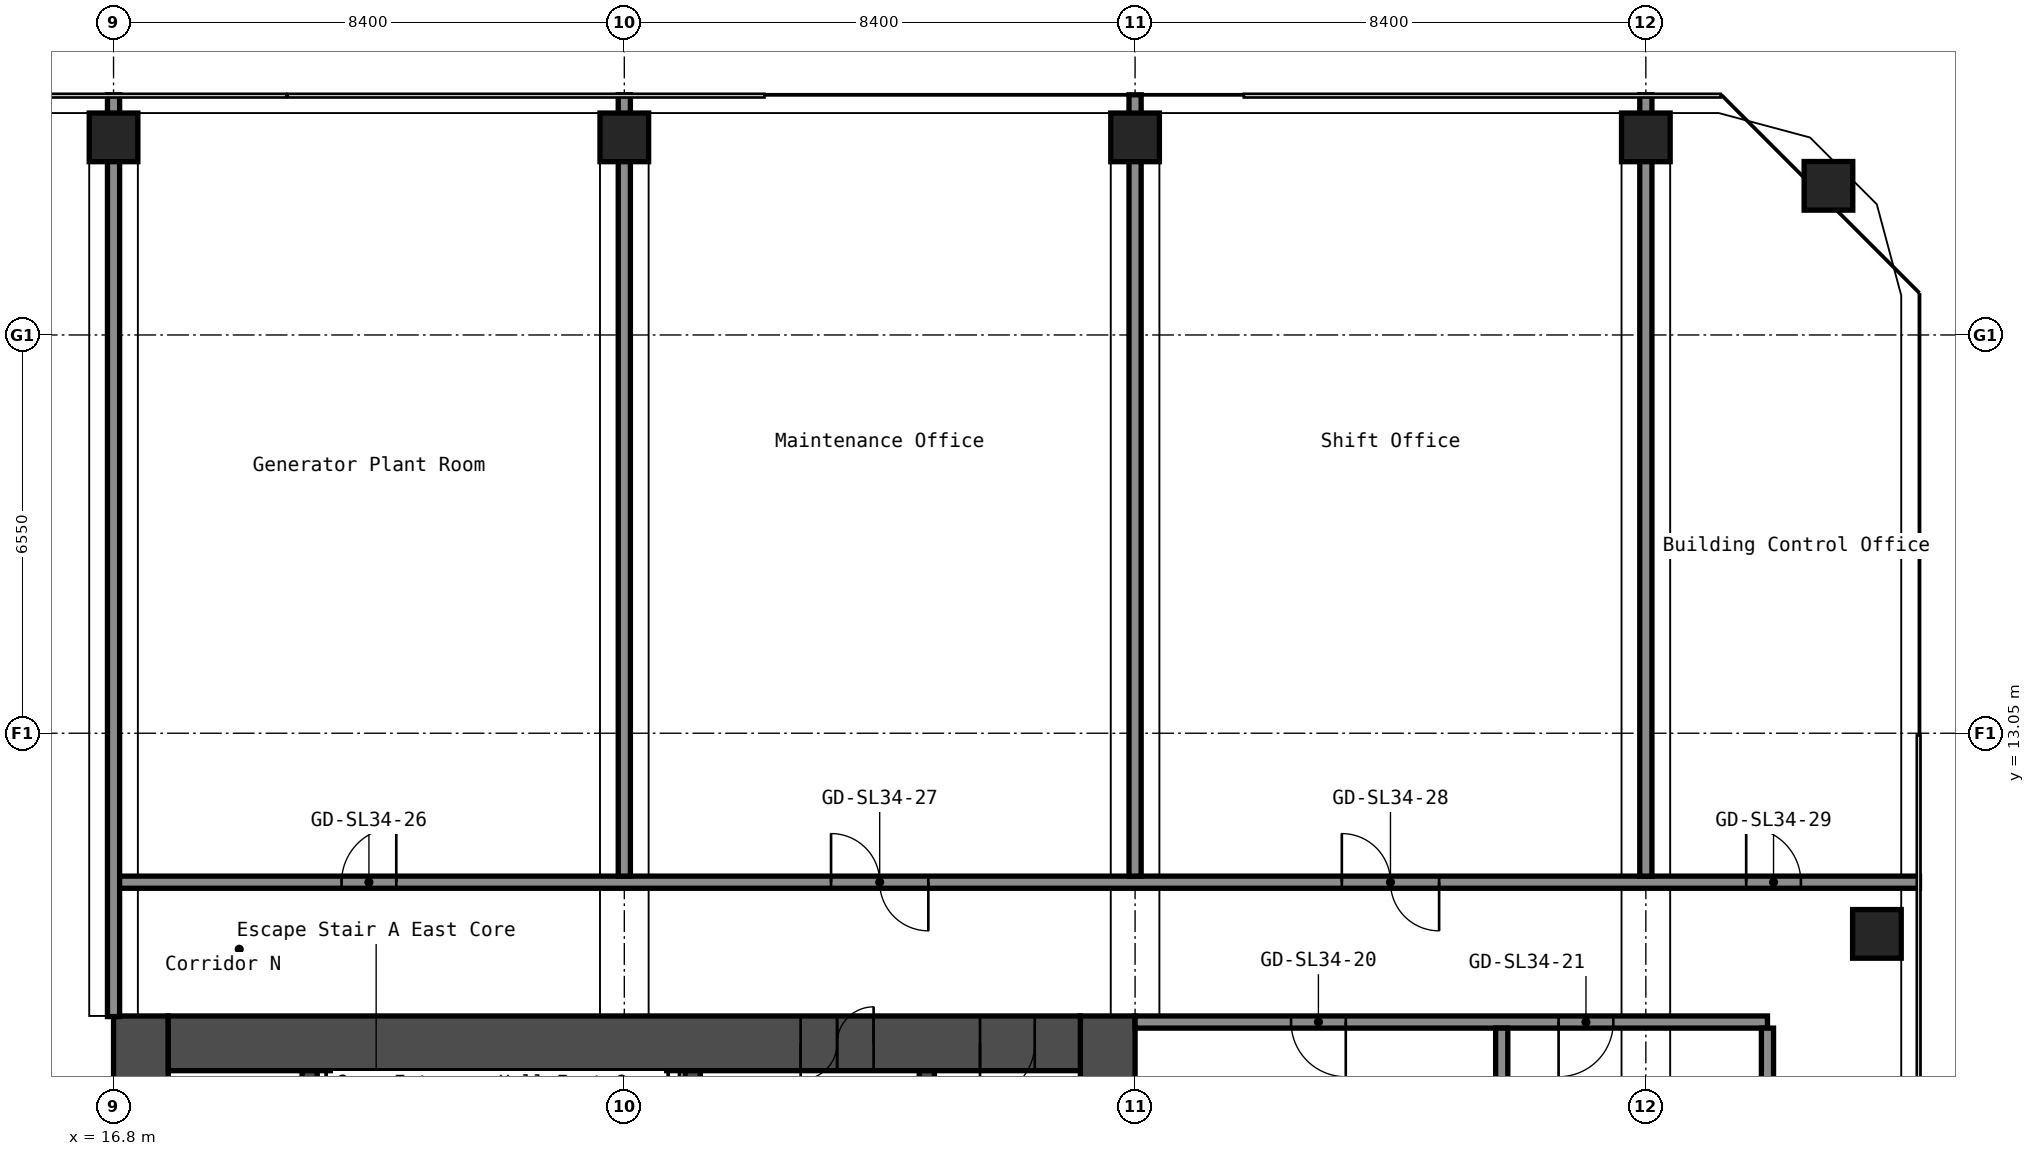
"""IFC4 building model, lengths in metres.
Left out: names, types, materials, properties, quantities, classifications, styles, units other than length and angle.
Written with IfcOpenShell. Run it as: python <this file> out.ifc"""

import sys

from ifc_helpers import new_model, si_unit, direction, frame, frame_2d, origin, origin_2d, place, context, subcontext, project, spatial, rectangle, hollow_rectangle, extrude, element, fill, save


model = new_model("IFC4")
c1 = context("Model", 3, precision=1e-05, world=origin(), true_north=direction((0.0, 1.0)))
c2 = subcontext(c1, "Body", "Model", "MODEL_VIEW")
j1 = project(units=[si_unit("LENGTHUNIT", "METRE"), si_unit("PLANEANGLEUNIT", "RADIAN")], contexts=[c1])
p1 = place(None, origin())
s1 = spatial("IfcSite", under=j1, at=p1, CompositionType="ELEMENT")
p2 = place(p1, origin())
s2 = spatial("IfcBuilding", under=s1, at=p2, CompositionType="ELEMENT")
p3 = place(p2, frame((0.0, 0.0, 120.2)))
s3 = spatial("IfcBuildingStorey", under=s2, at=p3, CompositionType="ELEMENT", Elevation=120.2)
for number, where, z_axis, x_axis in (
    (1, (16.8, 22.85, 0.0), (0.0, 0.0, 1.0), (1.0, 0.0, 0.0)),
    (2, (25.2, 22.85, 0.0), (0.0, 0.0, 1.0), (1.0, 0.0, 0.0)),
    (3, (33.6, 22.85, 0.0), (0.0, 0.0, 1.0), (1.0, 0.0, 0.0)),
    (4, (42.0, 22.85, 0.0), (0.0, 0.0, 1.0), (1.0, 0.0, 0.0)),
    (5, (45.8, 9.75, 0.0), (0.0, 0.0, 1.0), (1.0, 0.0, 0.0)),
    (6, (45.003, 22.053, 0.0), (0.0, 0.0, 1.0), (1.0, 0.0, 0.0)),
):
    element("IfcColumn", number, at=place(p3, frame(where, z_axis=z_axis, x_axis=x_axis)), inside=s3, PredefinedType="COLUMN", context=c2, shape_type="SweptSolid", body=[
        extrude(hollow_rectangle(XDim=0.8, YDim=0.8, WallThickness=0.032, at=origin_2d()), origin(), (0.0, 0.0, 1.0), 4.1),
    ])
p4 = place(p3, frame((17.25, -8.4, 0.0), z_axis=(0.0, 0.0, 1.0), x_axis=(0.0, 1.0, 0.0)))
e7 = element("IfcWall", 7, at=p4, inside=s3, PredefinedType="SHEAR", context=c2, shape_type="SweptSolid", body=[
    extrude(rectangle(XDim=16.8, YDim=0.9, at=frame_2d((8.4, 0.0))), origin(), (0.0, 0.0, 1.0), 4.1),
])
p5 = place(p4, frame((7.1, 0.0, 0.0)))
e8 = element("IfcOpeningElement", 8, at=p5, cuts=e7, PredefinedType="OPENING", context=c2, shape_type="SweptSolid", body=[
    extrude(rectangle(XDim=1.6, YDim=2.1, at=frame_2d((0.8, 1.05))), frame((0.0, 0.46, 0.0), z_axis=(0.0, -1.0, 0.0), x_axis=(1.0, 0.0, 0.0)), (0.0, 0.0, 1.0), 0.92),
])
p6 = place(p3, frame((33.15, -8.4, 0.0), z_axis=(0.0, 0.0, 1.0), x_axis=(0.0, 1.0, 0.0)))
e9 = element("IfcWall", 9, at=p6, inside=s3, PredefinedType="SHEAR", context=c2, shape_type="SweptSolid", body=[
    extrude(rectangle(XDim=16.8, YDim=0.9, at=frame_2d((8.4, 0.0))), origin(), (0.0, 0.0, 1.0), 4.1),
])
p7 = place(p3, frame((17.7, 7.95, 0.0), z_axis=(0.0, 0.0, 1.0), x_axis=(1.0, 0.0, 0.0)))
e10 = element("IfcWall", 10, at=p7, inside=s3, PredefinedType="SHEAR", context=c2, shape_type="SweptSolid", body=[
    extrude(rectangle(XDim=15.0, YDim=0.9, at=frame_2d((7.5, 0.0))), origin(), (0.0, 0.0, 1.0), 4.1),
])
p8 = place(p7, frame((10.4, 0.0, 0.0)))
e11 = element("IfcOpeningElement", 11, at=p8, cuts=e10, PredefinedType="OPENING", context=c2, shape_type="SweptSolid", body=[
    extrude(rectangle(XDim=1.2, YDim=2.1, at=frame_2d((0.6, 1.05))), frame((0.0, 0.46, 0.0), z_axis=(0.0, -1.0, 0.0), x_axis=(1.0, 0.0, 0.0)), (0.0, 0.0, 1.0), 0.92),
])
p9 = place(p7, frame((13.35, 0.0, 0.0)))
e12 = element("IfcOpeningElement", 12, at=p9, cuts=e10, PredefinedType="OPENING", context=c2, shape_type="SweptSolid", body=[
    extrude(rectangle(XDim=0.9, YDim=2.1, at=frame_2d((0.45, 1.05))), frame((0.0, 0.46, 0.0), z_axis=(0.0, -1.0, 0.0), x_axis=(1.0, 0.0, 0.0)), (0.0, 0.0, 1.0), 0.92),
])
p10 = place(p3, frame((20.025, 1.2, 0.0), z_axis=(0.0, 0.0, 1.0), x_axis=(0.0, 1.0, 0.0)))
e13 = element("IfcWall", 13, at=p10, inside=s3, PredefinedType="SHEAR", context=c2, shape_type="SweptSolid", body=[
    extrude(rectangle(XDim=6.3, YDim=0.25, at=frame_2d((3.15, 0.0))), origin(), (0.0, 0.0, 1.0), 4.1),
])
p11 = place(p3, frame((26.325, 3.75, 0.0), z_axis=(0.0, 0.0, 1.0), x_axis=(0.0, 1.0, 0.0)))
e14 = element("IfcWall", 14, at=p11, inside=s3, PredefinedType="SHEAR", context=c2, shape_type="SweptSolid", body=[
    extrude(rectangle(XDim=3.75, YDim=0.25, at=frame_2d((1.875, 0.0))), origin(), (0.0, 0.0, 1.0), 4.1),
])
p12 = place(p11, frame((1.25, 0.0, 0.0)))
e15 = element("IfcOpeningElement", 15, at=p12, cuts=e14, PredefinedType="OPENING", context=c2, shape_type="SweptSolid", body=[
    extrude(rectangle(XDim=1.2, YDim=2.1, at=frame_2d((0.6, 1.05))), frame((0.0, 0.135, 0.0), z_axis=(0.0, -1.0, 0.0), x_axis=(1.0, 0.0, 0.0)), (0.0, 0.0, 1.0), 0.27),
])
p13 = place(p3, frame((30.175, 1.45, 0.0), z_axis=(0.0, 0.0, 1.0), x_axis=(0.0, 1.0, 0.0)))
e16 = element("IfcWall", 16, at=p13, inside=s3, PredefinedType="SHEAR", context=c2, shape_type="SweptSolid", body=[
    extrude(rectangle(XDim=6.05, YDim=0.25, at=frame_2d((3.025, 0.0))), origin(), (0.0, 0.0, 1.0), 4.1),
])
p14 = place(p13, frame((2.625, 0.0, 0.0)))
e17 = element("IfcOpeningElement", 17, at=p14, cuts=e16, PredefinedType="OPENING", context=c2, shape_type="SweptSolid", body=[
    extrude(rectangle(XDim=1.1, YDim=2.1, at=frame_2d((0.55, 1.05))), frame((0.0, 0.135, 0.0), z_axis=(0.0, -1.0, 0.0), x_axis=(1.0, 0.0, 0.0)), (0.0, 0.0, 1.0), 0.27),
])
p15 = place(p3, frame((33.6, 8.3, 0.0), z_axis=(0.0, 0.0, 1.0), x_axis=(1.0, 0.0, 0.0)))
e18 = element("IfcWall", 18, at=p15, inside=s3, PredefinedType="PARTITIONING", context=c2, shape_type="SweptSolid", body=[
    extrude(rectangle(XDim=10.4, YDim=0.2, at=frame_2d((5.2, 0.0))), origin(), (0.0, 0.0, 1.0), 4.1),
])
p16 = place(p15, frame((2.565, 0.0, 0.0)))
e19 = element("IfcOpeningElement", 19, at=p16, cuts=e18, PredefinedType="OPENING", context=c2, shape_type="SweptSolid", body=[
    extrude(rectangle(XDim=0.9, YDim=2.1, at=frame_2d((0.45, 1.05))), frame((0.0, 0.11, 0.0), z_axis=(0.0, -1.0, 0.0), x_axis=(1.0, 0.0, 0.0)), (0.0, 0.0, 1.0), 0.22),
])
p17 = place(p15, frame((6.965, 0.0, 0.0)))
e20 = element("IfcOpeningElement", 20, at=p17, cuts=e18, PredefinedType="OPENING", context=c2, shape_type="SweptSolid", body=[
    extrude(rectangle(XDim=0.9, YDim=2.1, at=frame_2d((0.45, 1.05))), frame((0.0, 0.11, 0.0), z_axis=(0.0, -1.0, 0.0), x_axis=(1.0, 0.0, 0.0)), (0.0, 0.0, 1.0), 0.22),
])
p18 = place(p3, frame((16.8, 10.6, 0.0), z_axis=(0.0, 0.0, 1.0), x_axis=(1.0, 0.0, 0.0)))
e21 = element("IfcWall", 21, at=p18, inside=s3, PredefinedType="PARTITIONING", context=c2, shape_type="SweptSolid", body=[
    extrude(rectangle(XDim=29.7, YDim=0.2, at=frame_2d((14.85, 0.0))), origin(), (0.0, 0.0, 1.0), 4.1),
])
p19 = place(p18, frame((3.75, 0.0, 0.0)))
e22 = element("IfcOpeningElement", 22, at=p19, cuts=e21, PredefinedType="OPENING", context=c2, shape_type="SweptSolid", body=[
    extrude(rectangle(XDim=0.9, YDim=2.1, at=frame_2d((0.45, 1.05))), frame((0.0, 0.11, 0.0), z_axis=(0.0, -1.0, 0.0), x_axis=(1.0, 0.0, 0.0)), (0.0, 0.0, 1.0), 0.22),
])
p20 = place(p18, frame((11.8, 0.0, 0.0)))
e23 = element("IfcOpeningElement", 23, at=p20, cuts=e21, PredefinedType="OPENING", context=c2, shape_type="SweptSolid", body=[
    extrude(rectangle(XDim=1.6, YDim=2.1, at=frame_2d((0.8, 1.05))), frame((0.0, 0.11, 0.0), z_axis=(0.0, -1.0, 0.0), x_axis=(1.0, 0.0, 0.0)), (0.0, 0.0, 1.0), 0.22),
])
p21 = place(p18, frame((20.2, 0.0, 0.0)))
e24 = element("IfcOpeningElement", 24, at=p21, cuts=e21, PredefinedType="OPENING", context=c2, shape_type="SweptSolid", body=[
    extrude(rectangle(XDim=1.6, YDim=2.1, at=frame_2d((0.8, 1.05))), frame((0.0, 0.11, 0.0), z_axis=(0.0, -1.0, 0.0), x_axis=(1.0, 0.0, 0.0)), (0.0, 0.0, 1.0), 0.22),
])
p22 = place(p18, frame((26.85, 0.0, 0.0)))
e25 = element("IfcOpeningElement", 25, at=p22, cuts=e21, PredefinedType="OPENING", context=c2, shape_type="SweptSolid", body=[
    extrude(rectangle(XDim=0.9, YDim=2.1, at=frame_2d((0.45, 1.05))), frame((0.0, 0.11, 0.0), z_axis=(0.0, -1.0, 0.0), x_axis=(1.0, 0.0, 0.0)), (0.0, 0.0, 1.0), 0.22),
])
p23 = place(p3, frame((16.8, 8.39, 0.0), z_axis=(0.0, 0.0, 1.0), x_axis=(0.0, 1.0, 0.0)))
e26 = element("IfcWall", 26, at=p23, inside=s3, PredefinedType="PARTITIONING", context=c2, shape_type="SweptSolid", body=[
    extrude(rectangle(XDim=15.16, YDim=0.2, at=frame_2d((7.58, 0.0))), origin(), (0.0, 0.0, 1.0), 4.1),
])
for number, where, z_axis, x_axis in (
    (27, (25.2, 10.7, 0.0), (0.0, 0.0, 1.0), (0.0, 1.0, 0.0)),
    (28, (33.6, 10.7, 0.0), (0.0, 0.0, 1.0), (0.0, 1.0, 0.0)),
):
    element("IfcWall", number, at=place(p3, frame(where, z_axis=z_axis, x_axis=x_axis)), inside=s3, PredefinedType="PARTITIONING", context=c2, shape_type="SweptSolid", body=[
        extrude(rectangle(XDim=12.85, YDim=0.2, at=frame_2d((6.425, 0.0))), origin(), (0.0, 0.0, 1.0), 4.1),
    ])
p24 = place(p3, frame((39.63, 0.0, 0.0), z_axis=(0.0, 0.0, 1.0), x_axis=(0.0, 1.0, 0.0)))
e29 = element("IfcWall", 29, at=p24, inside=s3, PredefinedType="PARTITIONING", context=c2, shape_type="SweptSolid", body=[
    extrude(rectangle(XDim=8.2, YDim=0.2, at=frame_2d((4.1, 0.0))), origin(), (0.0, 0.0, 1.0), 4.1),
])
p25 = place(p3, frame((42.0, 10.7, 0.0), z_axis=(0.0, 0.0, 1.0), x_axis=(0.0, 1.0, 0.0)))
e30 = element("IfcWall", 30, at=p25, inside=s3, PredefinedType="PARTITIONING", context=c2, shape_type="SweptSolid", body=[
    extrude(rectangle(XDim=12.85, YDim=0.2, at=frame_2d((6.425, 0.0))), origin(), (0.0, 0.0, 1.0), 4.1),
])
p26 = place(p3, frame((44.0, -8.2, 0.0), z_axis=(0.0, 0.0, 1.0), x_axis=(0.0, 1.0, 0.0)))
e31 = element("IfcWall", 31, at=p26, inside=s3, PredefinedType="PARTITIONING", context=c2, shape_type="SweptSolid", body=[
    extrude(rectangle(XDim=16.4, YDim=0.2, at=frame_2d((8.2, 0.0))), origin(), (0.0, 0.0, 1.0), 4.1),
])
p27 = place(p8, origin())
e32 = element("IfcDoor", 32, at=p27, inside=s3, OperationType="DOUBLE_DOOR_SINGLE_SWING", PredefinedType="DOOR", context=c2, shape_type="SweptSolid", body=[
    extrude(rectangle(XDim=1.2, YDim=2.1, at=frame_2d((0.6, 1.05))), frame((0.0, 0.025, 0.0), z_axis=(0.0, -1.0, 0.0), x_axis=(1.0, 0.0, 0.0)), (0.0, 0.0, 1.0), 0.05),
])
fill(e11, e32)
p28 = place(p9, origin())
e33 = element("IfcDoor", 33, at=p28, inside=s3, OperationType="SINGLE_SWING_LEFT", PredefinedType="DOOR", context=c2, shape_type="SweptSolid", body=[
    extrude(rectangle(XDim=0.9, YDim=2.1, at=frame_2d((0.45, 1.05))), frame((0.0, 0.025, 0.0), z_axis=(0.0, -1.0, 0.0), x_axis=(1.0, 0.0, 0.0)), (0.0, 0.0, 1.0), 0.05),
])
fill(e12, e33)
p29 = place(p16, origin())
e34 = element("IfcDoor", 34, at=p29, inside=s3, OperationType="SINGLE_SWING_RIGHT", PredefinedType="DOOR", context=c2, shape_type="SweptSolid", body=[
    extrude(rectangle(XDim=0.9, YDim=2.1, at=frame_2d((0.45, 1.05))), frame((0.0, 0.025, 0.0), z_axis=(0.0, -1.0, 0.0), x_axis=(1.0, 0.0, 0.0)), (0.0, 0.0, 1.0), 0.05),
])
fill(e19, e34)
p30 = place(p17, origin())
e35 = element("IfcDoor", 35, at=p30, inside=s3, OperationType="SINGLE_SWING_LEFT", PredefinedType="DOOR", context=c2, shape_type="SweptSolid", body=[
    extrude(rectangle(XDim=0.9, YDim=2.1, at=frame_2d((0.45, 1.05))), frame((0.0, 0.025, 0.0), z_axis=(0.0, -1.0, 0.0), x_axis=(1.0, 0.0, 0.0)), (0.0, 0.0, 1.0), 0.05),
])
fill(e20, e35)
p31 = place(p19, origin())
e36 = element("IfcDoor", 36, at=p31, inside=s3, OperationType="SINGLE_SWING_LEFT", PredefinedType="DOOR", context=c2, shape_type="SweptSolid", body=[
    extrude(rectangle(XDim=0.9, YDim=2.1, at=frame_2d((0.45, 1.05))), frame((0.0, 0.025, 0.0), z_axis=(0.0, -1.0, 0.0), x_axis=(1.0, 0.0, 0.0)), (0.0, 0.0, 1.0), 0.05),
])
fill(e22, e36)
p32 = place(p20, origin())
e37 = element("IfcDoor", 37, at=p32, inside=s3, OperationType="DOUBLE_DOOR_SINGLE_SWING", PredefinedType="DOOR", context=c2, shape_type="SweptSolid", body=[
    extrude(rectangle(XDim=1.6, YDim=2.1, at=frame_2d((0.8, 1.05))), frame((0.0, 0.025, 0.0), z_axis=(0.0, -1.0, 0.0), x_axis=(1.0, 0.0, 0.0)), (0.0, 0.0, 1.0), 0.05),
])
fill(e23, e37)
p33 = place(p21, origin())
e38 = element("IfcDoor", 38, at=p33, inside=s3, OperationType="DOUBLE_DOOR_SINGLE_SWING", PredefinedType="DOOR", context=c2, shape_type="SweptSolid", body=[
    extrude(rectangle(XDim=1.6, YDim=2.1, at=frame_2d((0.8, 1.05))), frame((0.0, 0.025, 0.0), z_axis=(0.0, -1.0, 0.0), x_axis=(1.0, 0.0, 0.0)), (0.0, 0.0, 1.0), 0.05),
])
fill(e24, e38)
p34 = place(p22, origin())
e39 = element("IfcDoor", 39, at=p34, inside=s3, OperationType="SINGLE_SWING_RIGHT", PredefinedType="DOOR", context=c2, shape_type="SweptSolid", body=[
    extrude(rectangle(XDim=0.9, YDim=2.1, at=frame_2d((0.45, 1.05))), frame((0.0, 0.025, 0.0), z_axis=(0.0, -1.0, 0.0), x_axis=(1.0, 0.0, 0.0)), (0.0, 0.0, 1.0), 0.05),
])
fill(e25, e39)
save(model, sys.argv[1])
